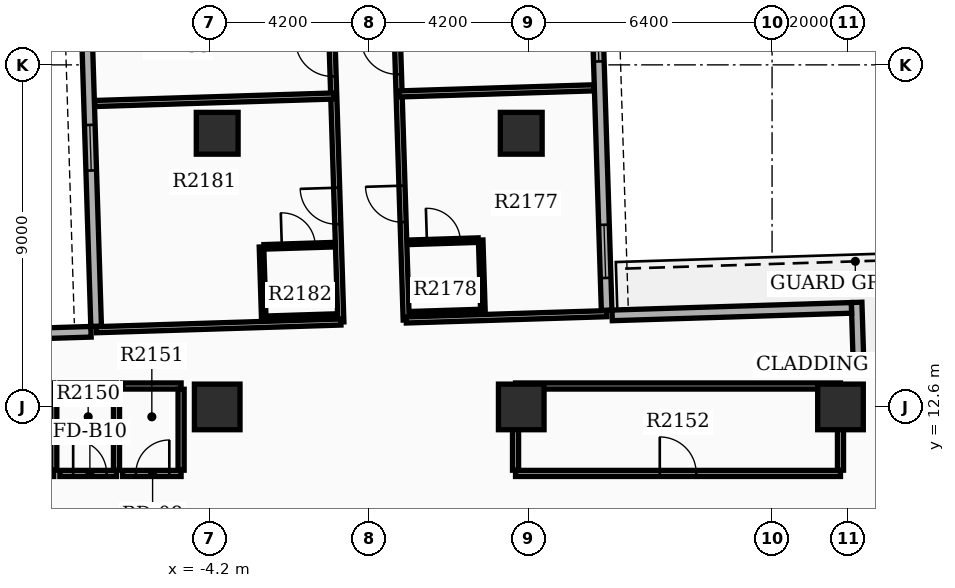
"""IFC4 building model, lengths in metres.
Left out: names, types, materials, properties, quantities, classifications, styles, units other than length and angle.
Written with IfcOpenShell. Run it as: python <this file> out.ifc"""

import sys

from ifc_helpers import new_model, si_unit, direction, frame, frame_2d, origin, origin_2d, place, context, subcontext, project, spatial, rectangle, extrude, element, fill, save


model = new_model("IFC4")
c1 = context("Model", 3, precision=1e-05, world=origin(), true_north=direction((0.0, 1.0)))
c2 = subcontext(c1, "Body", "Model", "MODEL_VIEW")
j1 = project(units=[si_unit("LENGTHUNIT", "METRE"), si_unit("PLANEANGLEUNIT", "RADIAN")], contexts=[c1])
p1 = place(None, origin())
s1 = spatial("IfcSite", under=j1, at=p1, CompositionType="ELEMENT")
p2 = place(p1, origin())
s2 = spatial("IfcBuilding", under=s1, at=p2, CompositionType="ELEMENT")
p3 = place(p2, frame((0.0, 0.0, 135.9)))
s3 = spatial("IfcBuildingStorey", under=s2, at=p3, CompositionType="ELEMENT", Elevation=135.9)
for number, where, z_axis, x_axis in (
    (1, (12.4, 12.6, 0.0), (0.0, 0.0, 1.0), (1.0, 0.0, 0.0)),
    (2, (4.0, 12.6, 0.0), (0.0, 0.0, 1.0), (1.0, 0.0, 0.0)),
    (3, (-4.0, 12.6, 0.0), (0.0, 0.0, 1.0), (1.0, 0.0, 0.0)),
):
    element("IfcColumn", number, at=place(p3, frame(where, z_axis=z_axis, x_axis=x_axis)), inside=s3, PredefinedType="COLUMN", context=c2, shape_type="SweptSolid", body=[
        extrude(rectangle(XDim=1.2, YDim=1.2, at=origin_2d()), origin(), (0.0, 0.0, 1.0), 3.9),
    ])
for number, where, z_axis, x_axis in (
    (4, (-4.0, 19.8, 0.0), (0.0, 0.0, 1.0), (1.0, 0.0, 0.0)),
    (5, (4.0, 19.8, 0.0), (0.0, 0.0, 1.0), (1.0, 0.0, 0.0)),
):
    element("IfcColumn", number, at=place(p3, frame(where, z_axis=z_axis, x_axis=x_axis)), inside=s3, PredefinedType="COLUMN", context=c2, shape_type="SweptSolid", body=[
        extrude(rectangle(XDim=1.1, YDim=1.1, at=origin_2d()), origin(), (0.0, 0.0, 1.0), 3.9),
    ])
p4 = place(p3, frame((6.247, 15.144, 0.0), z_axis=(0.0, 0.0, 1.0), x_axis=(-0.031398187845, 0.999506955354, 0.0)))
e6 = element("IfcWall", 6, at=p4, inside=s3, PredefinedType="STANDARD", context=c2, shape_type="SweptSolid", body=[
    extrude(rectangle(XDim=20.1, YDim=0.28, at=frame_2d((10.05, 0.0))), origin(), (0.0, 0.0, 1.0), 2.97),
])
p5 = place(p4, frame((0.85, 0.0, 0.8)))
e7 = element("IfcOpeningElement", 7, at=p5, cuts=e6, PredefinedType="OPENING", context=c2, shape_type="SweptSolid", body=[
    extrude(rectangle(XDim=1.4, YDim=1.6, at=frame_2d((0.7, 0.8))), frame((0.0, 0.15, 0.0), z_axis=(0.0, -1.0, 0.0), x_axis=(1.0, 0.0, 0.0)), (0.0, 0.0, 1.0), 0.3),
])
p6 = place(p4, frame((6.55, 0.0, 0.8)))
e8 = element("IfcOpeningElement", 8, at=p6, cuts=e6, PredefinedType="OPENING", context=c2, shape_type="SweptSolid", body=[
    extrude(rectangle(XDim=1.4, YDim=1.6, at=frame_2d((0.7, 0.8))), frame((0.0, 0.15, 0.0), z_axis=(0.0, -1.0, 0.0), x_axis=(1.0, 0.0, 0.0)), (0.0, 0.0, 1.0), 0.3),
])
p7 = place(p4, frame((10.25, 0.0, 0.8)))
e9 = element("IfcOpeningElement", 9, at=p7, cuts=e6, PredefinedType="OPENING", context=c2, shape_type="SweptSolid", body=[
    extrude(rectangle(XDim=1.4, YDim=1.6, at=frame_2d((0.7, 0.8))), frame((0.0, 0.15, 0.0), z_axis=(0.0, -1.0, 0.0), x_axis=(1.0, 0.0, 0.0)), (0.0, 0.0, 1.0), 0.3),
])
p8 = place(p4, frame((13.45, 0.0, 0.8)))
e10 = element("IfcOpeningElement", 10, at=p8, cuts=e6, PredefinedType="OPENING", context=c2, shape_type="SweptSolid", body=[
    extrude(rectangle(XDim=1.4, YDim=1.6, at=frame_2d((0.7, 0.8))), frame((0.0, 0.15, 0.0), z_axis=(0.0, -1.0, 0.0), x_axis=(1.0, 0.0, 0.0)), (0.0, 0.0, 1.0), 0.3),
])
p9 = place(p3, frame((-7.817, 34.812, 0.0), z_axis=(0.0, 0.0, 1.0), x_axis=(0.031410322165, -0.999506574096, 0.0)))
e11 = element("IfcWall", 11, at=p9, inside=s3, PredefinedType="STANDARD", context=c2, shape_type="SweptSolid", body=[
    extrude(rectangle(XDim=20.1, YDim=0.28, at=frame_2d((10.05, 0.0))), origin(), (0.0, 0.0, 1.0), 2.97),
])
p10 = place(p9, frame((0.85, 0.0, 0.8)))
e12 = element("IfcOpeningElement", 12, at=p10, cuts=e11, PredefinedType="OPENING", context=c2, shape_type="SweptSolid", body=[
    extrude(rectangle(XDim=1.4, YDim=1.6, at=frame_2d((0.7, 0.8))), frame((0.0, 0.15, 0.0), z_axis=(0.0, -1.0, 0.0), x_axis=(1.0, 0.0, 0.0)), (0.0, 0.0, 1.0), 0.3),
])
p11 = place(p9, frame((4.05, 0.0, 0.8)))
e13 = element("IfcOpeningElement", 13, at=p11, cuts=e11, PredefinedType="OPENING", context=c2, shape_type="SweptSolid", body=[
    extrude(rectangle(XDim=1.4, YDim=1.6, at=frame_2d((0.7, 0.8))), frame((0.0, 0.15, 0.0), z_axis=(0.0, -1.0, 0.0), x_axis=(1.0, 0.0, 0.0)), (0.0, 0.0, 1.0), 0.3),
])
p12 = place(p9, frame((7.25, 0.0, 0.8)))
e14 = element("IfcOpeningElement", 14, at=p12, cuts=e11, PredefinedType="OPENING", context=c2, shape_type="SweptSolid", body=[
    extrude(rectangle(XDim=1.4, YDim=1.6, at=frame_2d((0.7, 0.8))), frame((0.0, 0.15, 0.0), z_axis=(0.0, -1.0, 0.0), x_axis=(1.0, 0.0, 0.0)), (0.0, 0.0, 1.0), 0.3),
])
p13 = place(p9, frame((10.95, 0.0, 0.8)))
e15 = element("IfcOpeningElement", 15, at=p13, cuts=e11, PredefinedType="OPENING", context=c2, shape_type="SweptSolid", body=[
    extrude(rectangle(XDim=1.4, YDim=1.6, at=frame_2d((0.7, 0.8))), frame((0.0, 0.15, 0.0), z_axis=(0.0, -1.0, 0.0), x_axis=(1.0, 0.0, 0.0)), (0.0, 0.0, 1.0), 0.3),
])
p14 = place(p9, frame((14.799, 0.0, 0.85)))
e16 = element("IfcOpeningElement", 16, at=p14, cuts=e11, PredefinedType="OPENING", context=c2, shape_type="SweptSolid", body=[
    extrude(rectangle(XDim=1.2, YDim=1.6, at=frame_2d((0.6, 0.8))), frame((0.0, 0.15, 0.0), z_axis=(0.0, -1.0, 0.0), x_axis=(1.0, 0.0, 0.0)), (0.0, 0.0, 1.0), 0.3),
])
p15 = place(p3, frame((14.235, 13.754, 0.0), z_axis=(0.0, 0.0, 1.0), x_axis=(-0.999506398264, -0.031415916822, 0.0)))
e17 = element("IfcWall", 17, at=p15, inside=s3, PredefinedType="STANDARD", context=c2, shape_type="SweptSolid", body=[
    extrude(rectangle(XDim=1.22, YDim=0.28, at=frame_2d((0.61, 0.0))), origin(), (0.0, 0.0, 1.0), 2.97),
])
p16 = place(p3, frame((12.871, 13.851, 0.0), z_axis=(0.0, 0.0, 1.0), x_axis=(-0.031412596484, 0.999506502621, 0.0)))
e18 = element("IfcWall", 18, at=p16, inside=s3, PredefinedType="STANDARD", context=c2, shape_type="SweptSolid", body=[
    extrude(rectangle(XDim=1.5, YDim=0.28, at=frame_2d((0.75, 0.0))), origin(), (0.0, 0.0, 1.0), 2.97),
])
p17 = place(p3, frame((12.689, 15.206, 0.0), z_axis=(0.0, 0.0, 1.0), x_axis=(-0.999507262922, -0.031388395416, 0.0)))
e19 = element("IfcWall", 19, at=p17, inside=s3, PredefinedType="STANDARD", context=c2, shape_type="SweptSolid", body=[
    extrude(rectangle(XDim=6.3, YDim=0.28, at=frame_2d((3.15, 0.0))), origin(), (0.0, 0.0, 1.0), 2.97),
])
p18 = place(p3, frame((-13.618, 14.379, 0.0), z_axis=(0.0, 0.0, 1.0), x_axis=(0.999507224741, 0.031389611199, 0.0)))
e20 = element("IfcWall", 20, at=p18, inside=s3, PredefinedType="STANDARD", context=c2, shape_type="SweptSolid", body=[
    extrude(rectangle(XDim=6.3, YDim=0.28, at=frame_2d((3.15, 0.0))), origin(), (0.0, 0.0, 1.0), 2.97),
])
p19 = place(p3, frame((-11.5, 10.85, 0.0), z_axis=(0.0, 0.0, 1.0), x_axis=(1.0, 0.0, 0.0)))
e21 = element("IfcWall", 21, at=p19, inside=s3, PredefinedType="PARTITIONING", context=c2, shape_type="SweptSolid", body=[
    extrude(rectangle(XDim=3.2, YDim=0.16, at=frame_2d((1.6, 0.0))), origin(), (0.0, 0.0, 1.0), 2.96),
])
p20 = place(p19, frame((1.12, 0.0, 0.0)))
e22 = element("IfcOpeningElement", 22, at=p20, cuts=e21, PredefinedType="OPENING", context=c2, shape_type="SweptSolid", body=[
    extrude(rectangle(XDim=0.96, YDim=2.15, at=frame_2d((0.48, 1.075))), frame((0.0, 0.09, 0.0), z_axis=(0.0, -1.0, 0.0), x_axis=(1.0, 0.0, 0.0)), (0.0, 0.0, 1.0), 0.18),
])
p21 = place(p3, frame((-11.5, 13.15, 0.0), z_axis=(0.0, 0.0, 1.0), x_axis=(1.0, 0.0, 0.0)))
e23 = element("IfcWall", 23, at=p21, inside=s3, PredefinedType="PARTITIONING", context=c2, shape_type="SweptSolid", body=[
    extrude(rectangle(XDim=3.2, YDim=0.16, at=frame_2d((1.6, 0.0))), origin(), (0.0, 0.0, 1.0), 2.96),
])
p22 = place(p3, frame((-8.3, 10.935, 0.0), z_axis=(0.0, 0.0, 1.0), x_axis=(0.0, 1.0, 0.0)))
e24 = element("IfcWall", 24, at=p22, inside=s3, PredefinedType="PARTITIONING", context=c2, shape_type="SweptSolid", body=[
    extrude(rectangle(XDim=2.13, YDim=0.16, at=frame_2d((1.065, 0.0))), origin(), (0.0, 0.0, 1.0), 2.96),
])
p23 = place(p3, frame((-8.14, 10.85, 0.0), z_axis=(0.0, 0.0, 1.0), x_axis=(1.0, 0.0, 0.0)))
e25 = element("IfcWall", 25, at=p23, inside=s3, PredefinedType="PARTITIONING", context=c2, shape_type="SweptSolid", body=[
    extrude(rectangle(XDim=1.49, YDim=0.16, at=frame_2d((0.745, 0.0))), origin(), (0.0, 0.0, 1.0), 2.96),
])
p24 = place(p23, frame((0.35, 0.0, 0.0)))
e26 = element("IfcOpeningElement", 26, at=p24, cuts=e25, PredefinedType="OPENING", context=c2, shape_type="SweptSolid", body=[
    extrude(rectangle(XDim=0.88, YDim=2.1, at=frame_2d((0.44, 1.05))), frame((0.0, 0.09, 0.0), z_axis=(0.0, -1.0, 0.0), x_axis=(1.0, 0.0, 0.0)), (0.0, 0.0, 1.0), 0.18),
])
p25 = place(p3, frame((-8.14, 13.15, 0.0), z_axis=(0.0, 0.0, 1.0), x_axis=(1.0, 0.0, 0.0)))
e27 = element("IfcWall", 27, at=p25, inside=s3, PredefinedType="PARTITIONING", context=c2, shape_type="SweptSolid", body=[
    extrude(rectangle(XDim=1.49, YDim=0.16, at=frame_2d((0.745, 0.0))), origin(), (0.0, 0.0, 1.0), 2.96),
])
p26 = place(p3, frame((-6.65, 10.935, 0.0), z_axis=(0.0, 0.0, 1.0), x_axis=(0.0, 1.0, 0.0)))
e28 = element("IfcWall", 28, at=p26, inside=s3, PredefinedType="PARTITIONING", context=c2, shape_type="SweptSolid", body=[
    extrude(rectangle(XDim=2.13, YDim=0.16, at=frame_2d((1.065, 0.0))), origin(), (0.0, 0.0, 1.0), 2.96),
])
p27 = place(p3, frame((-6.49, 10.85, 0.0), z_axis=(0.0, 0.0, 1.0), x_axis=(1.0, 0.0, 0.0)))
e29 = element("IfcWall", 29, at=p27, inside=s3, PredefinedType="PARTITIONING", context=c2, shape_type="SweptSolid", body=[
    extrude(rectangle(XDim=1.54, YDim=0.16, at=frame_2d((0.77, 0.0))), origin(), (0.0, 0.0, 1.0), 2.96),
])
p28 = place(p27, frame((0.35, 0.0, 0.0)))
e30 = element("IfcOpeningElement", 30, at=p28, cuts=e29, PredefinedType="OPENING", context=c2, shape_type="SweptSolid", body=[
    extrude(rectangle(XDim=0.88, YDim=2.15, at=frame_2d((0.44, 1.075))), frame((0.0, 0.09, 0.0), z_axis=(0.0, -1.0, 0.0), x_axis=(1.0, 0.0, 0.0)), (0.0, 0.0, 1.0), 0.18),
])
p29 = place(p3, frame((-6.49, 13.15, 0.0), z_axis=(0.0, 0.0, 1.0), x_axis=(1.0, 0.0, 0.0)))
e31 = element("IfcWall", 31, at=p29, inside=s3, PredefinedType="PARTITIONING", context=c2, shape_type="SweptSolid", body=[
    extrude(rectangle(XDim=1.54, YDim=0.16, at=frame_2d((0.77, 0.0))), origin(), (0.0, 0.0, 1.0), 2.96),
])
p30 = place(p3, frame((-4.95, 10.935, 0.0), z_axis=(0.0, 0.0, 1.0), x_axis=(0.0, 1.0, 0.0)))
e32 = element("IfcWall", 32, at=p30, inside=s3, PredefinedType="PARTITIONING", context=c2, shape_type="SweptSolid", body=[
    extrude(rectangle(XDim=2.13, YDim=0.16, at=frame_2d((1.065, 0.0))), origin(), (0.0, 0.0, 1.0), 2.96),
])
p31 = place(p3, frame((3.85, 10.85, 0.0), z_axis=(0.0, 0.0, 1.0), x_axis=(1.0, 0.0, 0.0)))
e33 = element("IfcWall", 33, at=p31, inside=s3, PredefinedType="PARTITIONING", context=c2, shape_type="SweptSolid", body=[
    extrude(rectangle(XDim=8.55, YDim=0.16, at=frame_2d((4.275, 0.0))), origin(), (0.0, 0.0, 1.0), 2.96),
])
p32 = place(p31, frame((3.795, 0.0, 0.0)))
e34 = element("IfcOpeningElement", 34, at=p32, cuts=e33, PredefinedType="OPENING", context=c2, shape_type="SweptSolid", body=[
    extrude(rectangle(XDim=0.96, YDim=2.15, at=frame_2d((0.48, 1.075))), frame((0.0, 0.09, 0.0), z_axis=(0.0, -1.0, 0.0), x_axis=(1.0, 0.0, 0.0)), (0.0, 0.0, 1.0), 0.18),
])
p33 = place(p3, frame((3.85, 13.15, 0.0), z_axis=(0.0, 0.0, 1.0), x_axis=(1.0, 0.0, 0.0)))
e35 = element("IfcWall", 35, at=p33, inside=s3, PredefinedType="PARTITIONING", context=c2, shape_type="SweptSolid", body=[
    extrude(rectangle(XDim=8.55, YDim=0.16, at=frame_2d((4.275, 0.0))), origin(), (0.0, 0.0, 1.0), 2.96),
])
for number, where, z_axis, x_axis in (
    (36, (3.85, 10.935, 0.0), (0.0, 0.0, 1.0), (0.0, 1.0, 0.0)),
    (37, (12.4, 10.935, 0.0), (0.0, 0.0, 1.0), (0.0, 1.0, 0.0)),
):
    element("IfcWall", number, at=place(p3, frame(where, z_axis=z_axis, x_axis=x_axis)), inside=s3, PredefinedType="PARTITIONING", context=c2, shape_type="SweptSolid", body=[
        extrude(rectangle(XDim=2.13, YDim=0.16, at=frame_2d((1.065, 0.0))), origin(), (0.0, 0.0, 1.0), 2.96),
    ])
p34 = place(p3, frame((0.973, 14.888, 0.0), z_axis=(0.0, 0.0, 1.0), x_axis=(-0.031411552371, 0.999506535435, 0.0)))
e38 = element("IfcWall", 38, at=p34, inside=s3, PredefinedType="PARTITIONING", context=c2, shape_type="SweptSolid", body=[
    extrude(rectangle(XDim=9.7, YDim=0.16, at=frame_2d((4.85, 0.0))), origin(), (0.0, 0.0, 1.0), 2.96),
])
p35 = place(p34, frame((2.575, 0.0, 0.0)))
e39 = element("IfcOpeningElement", 39, at=p35, cuts=e38, PredefinedType="OPENING", context=c2, shape_type="SweptSolid", body=[
    extrude(rectangle(XDim=0.96, YDim=2.15, at=frame_2d((0.48, 1.075))), frame((0.0, 0.09, 0.0), z_axis=(0.0, -1.0, 0.0), x_axis=(1.0, 0.0, 0.0)), (0.0, 0.0, 1.0), 0.18),
])
p36 = place(p34, frame((6.467, 0.0, 0.0)))
e40 = element("IfcOpeningElement", 40, at=p36, cuts=e38, PredefinedType="OPENING", context=c2, shape_type="SweptSolid", body=[
    extrude(rectangle(XDim=0.96, YDim=2.15, at=frame_2d((0.48, 1.075))), frame((0.0, 0.09, 0.0), z_axis=(0.0, -1.0, 0.0), x_axis=(1.0, 0.0, 0.0)), (0.0, 0.0, 1.0), 0.18),
])
p37 = place(p3, frame((0.973, 14.888, 0.0), z_axis=(0.0, 0.0, 1.0), x_axis=(0.99950701053, 0.031396431354, 0.0)))
e41 = element("IfcWall", 41, at=p37, inside=s3, PredefinedType="PARTITIONING", context=c2, shape_type="SweptSolid", body=[
    extrude(rectangle(XDim=5.28, YDim=0.16, at=frame_2d((2.64, 0.0))), origin(), (0.0, 0.0, 1.0), 2.96),
])
p38 = place(p3, frame((0.786, 20.835, 0.0), z_axis=(0.0, 0.0, 1.0), x_axis=(0.999506957349, 0.031398124315, 0.0)))
e42 = element("IfcWall", 42, at=p38, inside=s3, PredefinedType="PARTITIONING", context=c2, shape_type="SweptSolid", body=[
    extrude(rectangle(XDim=5.132, YDim=0.16, at=frame_2d((2.566, 0.0))), origin(), (0.0, 0.0, 1.0), 2.96),
])
p39 = place(p3, frame((1.049, 16.931, 0.0), z_axis=(0.0, 0.0, 1.0), x_axis=(0.999507353951, 0.031385496622, 0.0)))
e43 = element("IfcWall", 43, at=p39, inside=s3, PredefinedType="PARTITIONING", context=c2, shape_type="SweptSolid", body=[
    extrude(rectangle(XDim=1.82, YDim=0.12, at=frame_2d((0.91, 0.0))), origin(), (0.0, 0.0, 1.0), 2.96),
])
p40 = place(p39, frame((0.47, 0.0, 0.0)))
e44 = element("IfcOpeningElement", 44, at=p40, cuts=e43, PredefinedType="OPENING", context=c2, shape_type="SweptSolid", body=[
    extrude(rectangle(XDim=0.88, YDim=2.1, at=frame_2d((0.44, 1.05))), frame((0.0, 0.07, 0.0), z_axis=(0.0, -1.0, 0.0), x_axis=(1.0, 0.0, 0.0)), (0.0, 0.0, 1.0), 0.14),
])
p41 = place(p3, frame((1.108, 15.052, 0.0), z_axis=(0.0, 0.0, 1.0), x_axis=(0.999507221803, 0.031389704724, 0.0)))
e45 = element("IfcWall", 45, at=p41, inside=s3, PredefinedType="PARTITIONING", context=c2, shape_type="SweptSolid", body=[
    extrude(rectangle(XDim=1.82, YDim=0.12, at=frame_2d((0.91, 0.0))), origin(), (0.0, 0.0, 1.0), 2.96),
])
p42 = place(p3, frame((2.992, 15.111, 0.0), z_axis=(0.0, 0.0, 1.0), x_axis=(-0.031295563454, 0.999510173889, 0.0)))
e46 = element("IfcWall", 46, at=p42, inside=s3, PredefinedType="PARTITIONING", context=c2, shape_type="SweptSolid", body=[
    extrude(rectangle(XDim=1.88, YDim=0.12, at=frame_2d((0.94, 0.0))), origin(), (0.0, 0.0, 1.0), 2.96),
])
p43 = place(p3, frame((-0.746, 14.834, 0.0), z_axis=(0.0, 0.0, 1.0), x_axis=(-0.031411552371, 0.999506535435, 0.0)))
e47 = element("IfcWall", 47, at=p43, inside=s3, PredefinedType="PARTITIONING", context=c2, shape_type="SweptSolid", body=[
    extrude(rectangle(XDim=9.7, YDim=0.16, at=frame_2d((4.85, 0.0))), origin(), (0.0, 0.0, 1.0), 2.96),
])
p44 = place(p43, frame((2.575, 0.0, 0.0)))
e48 = element("IfcOpeningElement", 48, at=p44, cuts=e47, PredefinedType="OPENING", context=c2, shape_type="SweptSolid", body=[
    extrude(rectangle(XDim=0.96, YDim=2.15, at=frame_2d((0.48, 1.075))), frame((0.0, 0.09, 0.0), z_axis=(0.0, -1.0, 0.0), x_axis=(1.0, 0.0, 0.0)), (0.0, 0.0, 1.0), 0.18),
])
p45 = place(p43, frame((6.467, 0.0, 0.0)))
e49 = element("IfcOpeningElement", 49, at=p45, cuts=e47, PredefinedType="OPENING", context=c2, shape_type="SweptSolid", body=[
    extrude(rectangle(XDim=0.96, YDim=2.15, at=frame_2d((0.48, 1.075))), frame((0.0, 0.09, 0.0), z_axis=(0.0, -1.0, 0.0), x_axis=(1.0, 0.0, 0.0)), (0.0, 0.0, 1.0), 0.18),
])
p46 = place(p3, frame((-0.746, 14.834, 0.0), z_axis=(0.0, 0.0, 1.0), x_axis=(-0.999506028801, -0.031427669178, 0.0)))
e50 = element("IfcWall", 50, at=p46, inside=s3, PredefinedType="PARTITIONING", context=c2, shape_type="SweptSolid", body=[
    extrude(rectangle(XDim=6.44, YDim=0.16, at=frame_2d((3.22, 0.0))), origin(), (0.0, 0.0, 1.0), 2.96),
])
p47 = place(p3, frame((-0.933, 20.781, 0.0), z_axis=(0.0, 0.0, 1.0), x_axis=(-0.999506000601, -0.031428566013, 0.0)))
e51 = element("IfcWall", 51, at=p47, inside=s3, PredefinedType="PARTITIONING", context=c2, shape_type="SweptSolid", body=[
    extrude(rectangle(XDim=6.292, YDim=0.16, at=frame_2d((3.146, 0.0))), origin(), (0.0, 0.0, 1.0), 2.96),
])
p48 = place(p3, frame((-2.769, 16.811, 0.0), z_axis=(0.0, 0.0, 1.0), x_axis=(0.999507221803, 0.031389704724, 0.0)))
e52 = element("IfcWall", 52, at=p48, inside=s3, PredefinedType="PARTITIONING", context=c2, shape_type="SweptSolid", body=[
    extrude(rectangle(XDim=1.82, YDim=0.12, at=frame_2d((0.91, 0.0))), origin(), (0.0, 0.0, 1.0), 2.96),
])
p49 = place(p48, frame((0.47, 0.0, 0.0)))
e53 = element("IfcOpeningElement", 53, at=p49, cuts=e52, PredefinedType="OPENING", context=c2, shape_type="SweptSolid", body=[
    extrude(rectangle(XDim=0.88, YDim=2.1, at=frame_2d((0.44, 1.05))), frame((0.0, 0.07, 0.0), z_axis=(0.0, -1.0, 0.0), x_axis=(1.0, 0.0, 0.0)), (0.0, 0.0, 1.0), 0.14),
])
p50 = place(p3, frame((-2.71, 14.932, 0.0), z_axis=(0.0, 0.0, 1.0), x_axis=(0.999503004171, 0.03152371574, 0.0)))
e54 = element("IfcWall", 54, at=p50, inside=s3, PredefinedType="PARTITIONING", context=c2, shape_type="SweptSolid", body=[
    extrude(rectangle(XDim=1.82, YDim=0.12, at=frame_2d((0.91, 0.0))), origin(), (0.0, 0.0, 1.0), 2.96),
])
p51 = place(p3, frame((-2.775, 14.93, 0.0), z_axis=(0.0, 0.0, 1.0), x_axis=(-0.031425292588, 0.999506103526, 0.0)))
e55 = element("IfcWall", 55, at=p51, inside=s3, PredefinedType="PARTITIONING", context=c2, shape_type="SweptSolid", body=[
    extrude(rectangle(XDim=1.88, YDim=0.12, at=frame_2d((0.94, 0.0))), origin(), (0.0, 0.0, 1.0), 2.96),
])
p52 = place(p5, origin())
e56 = element("IfcWindow", 56, at=p52, inside=s3, PartitioningType="SINGLE_PANEL", PredefinedType="WINDOW", context=c2, shape_type="SweptSolid", body=[
    extrude(rectangle(XDim=1.4, YDim=1.6, at=frame_2d((0.7, 0.8))), frame((0.0, 0.03, 0.0), z_axis=(0.0, -1.0, 0.0), x_axis=(1.0, 0.0, 0.0)), (0.0, 0.0, 1.0), 0.06),
])
fill(e7, e56)
p53 = place(p6, origin())
e57 = element("IfcWindow", 57, at=p53, inside=s3, PartitioningType="SINGLE_PANEL", PredefinedType="WINDOW", context=c2, shape_type="SweptSolid", body=[
    extrude(rectangle(XDim=1.4, YDim=1.6, at=frame_2d((0.7, 0.8))), frame((0.0, 0.03, 0.0), z_axis=(0.0, -1.0, 0.0), x_axis=(1.0, 0.0, 0.0)), (0.0, 0.0, 1.0), 0.06),
])
fill(e8, e57)
p54 = place(p14, origin())
e58 = element("IfcWindow", 58, at=p54, inside=s3, PartitioningType="SINGLE_PANEL", PredefinedType="WINDOW", context=c2, shape_type="SweptSolid", body=[
    extrude(rectangle(XDim=1.2, YDim=1.6, at=frame_2d((0.6, 0.8))), frame((0.0, 0.03, 0.0), z_axis=(0.0, -1.0, 0.0), x_axis=(1.0, 0.0, 0.0)), (0.0, 0.0, 1.0), 0.06),
])
fill(e16, e58)
p55 = place(p24, origin())
e59 = element("IfcDoor", 59, at=p55, inside=s3, OperationType="SINGLE_SWING_LEFT", PredefinedType="DOOR", context=c2, shape_type="SweptSolid", body=[
    extrude(rectangle(XDim=0.88, YDim=2.1, at=frame_2d((0.44, 1.05))), frame((0.0, 0.025, 0.0), z_axis=(0.0, -1.0, 0.0), x_axis=(1.0, 0.0, 0.0)), (0.0, 0.0, 1.0), 0.05),
])
fill(e26, e59)
p56 = place(p28, origin())
e60 = element("IfcDoor", 60, at=p56, inside=s3, OperationType="SINGLE_SWING_RIGHT", PredefinedType="DOOR", context=c2, shape_type="SweptSolid", body=[
    extrude(rectangle(XDim=0.88, YDim=2.15, at=frame_2d((0.44, 1.075))), frame((0.0, 0.025, 0.0), z_axis=(0.0, -1.0, 0.0), x_axis=(1.0, 0.0, 0.0)), (0.0, 0.0, 1.0), 0.05),
])
fill(e30, e60)
p57 = place(p32, origin())
e61 = element("IfcDoor", 61, at=p57, inside=s3, OperationType="SINGLE_SWING_LEFT", PredefinedType="DOOR", context=c2, shape_type="SweptSolid", body=[
    extrude(rectangle(XDim=0.96, YDim=2.15, at=frame_2d((0.48, 1.075))), frame((0.0, 0.025, 0.0), z_axis=(0.0, -1.0, 0.0), x_axis=(1.0, 0.0, 0.0)), (0.0, 0.0, 1.0), 0.05),
])
fill(e34, e61)
p58 = place(p35, origin())
e62 = element("IfcDoor", 62, at=p58, inside=s3, OperationType="SINGLE_SWING_RIGHT", PredefinedType="DOOR", context=c2, shape_type="SweptSolid", body=[
    extrude(rectangle(XDim=0.96, YDim=2.15, at=frame_2d((0.48, 1.075))), frame((0.0, 0.025, 0.0), z_axis=(0.0, -1.0, 0.0), x_axis=(1.0, 0.0, 0.0)), (0.0, 0.0, 1.0), 0.05),
])
fill(e39, e62)
p59 = place(p40, origin())
e63 = element("IfcDoor", 63, at=p59, inside=s3, OperationType="SINGLE_SWING_LEFT", PredefinedType="DOOR", context=c2, shape_type="SweptSolid", body=[
    extrude(rectangle(XDim=0.88, YDim=2.1, at=frame_2d((0.44, 1.05))), frame((0.0, 0.025, 0.0), z_axis=(0.0, -1.0, 0.0), x_axis=(1.0, 0.0, 0.0)), (0.0, 0.0, 1.0), 0.05),
])
fill(e44, e63)
p60 = place(p36, origin())
e64 = element("IfcDoor", 64, at=p60, inside=s3, OperationType="SINGLE_SWING_RIGHT", PredefinedType="DOOR", context=c2, shape_type="SweptSolid", body=[
    extrude(rectangle(XDim=0.96, YDim=2.15, at=frame_2d((0.48, 1.075))), frame((0.0, 0.025, 0.0), z_axis=(0.0, -1.0, 0.0), x_axis=(1.0, 0.0, 0.0)), (0.0, 0.0, 1.0), 0.05),
])
fill(e40, e64)
p61 = place(p44, origin())
e65 = element("IfcDoor", 65, at=p61, inside=s3, OperationType="SINGLE_SWING_RIGHT", PredefinedType="DOOR", context=c2, shape_type="SweptSolid", body=[
    extrude(rectangle(XDim=0.96, YDim=2.15, at=frame_2d((0.48, 1.075))), frame((0.0, 0.025, 0.0), z_axis=(0.0, -1.0, 0.0), x_axis=(1.0, 0.0, 0.0)), (0.0, 0.0, 1.0), 0.05),
])
fill(e48, e65)
p62 = place(p49, origin())
e66 = element("IfcDoor", 66, at=p62, inside=s3, OperationType="SINGLE_SWING_LEFT", PredefinedType="DOOR", context=c2, shape_type="SweptSolid", body=[
    extrude(rectangle(XDim=0.88, YDim=2.1, at=frame_2d((0.44, 1.05))), frame((0.0, 0.025, 0.0), z_axis=(0.0, -1.0, 0.0), x_axis=(1.0, 0.0, 0.0)), (0.0, 0.0, 1.0), 0.05),
])
fill(e53, e66)
p63 = place(p45, origin())
e67 = element("IfcDoor", 67, at=p63, inside=s3, OperationType="SINGLE_SWING_RIGHT", PredefinedType="DOOR", context=c2, shape_type="SweptSolid", body=[
    extrude(rectangle(XDim=0.96, YDim=2.15, at=frame_2d((0.48, 1.075))), frame((0.0, 0.025, 0.0), z_axis=(0.0, -1.0, 0.0), x_axis=(1.0, 0.0, 0.0)), (0.0, 0.0, 1.0), 0.05),
])
fill(e49, e67)
save(model, sys.argv[1])
